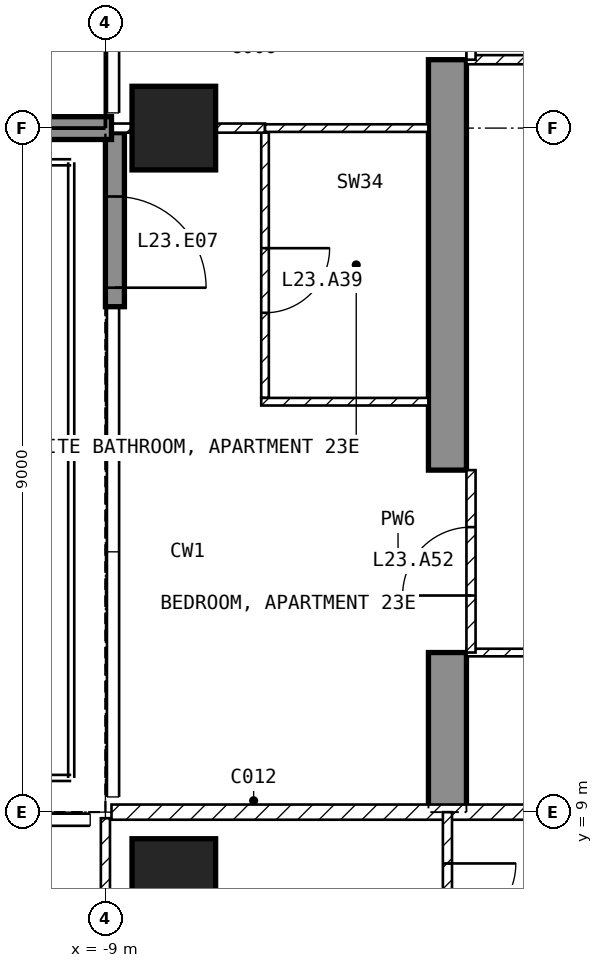
"""IFC4 building model, lengths in metres.
Left out: names, types, materials, properties, quantities, classifications, styles, units other than length and angle.
Written with IfcOpenShell. Run it as: python <this file> out.ifc"""

import sys

from ifc_helpers import new_model, si_unit, direction, frame, frame_2d, origin, origin_2d, place, context, subcontext, project, spatial, polyline, rectangle, outline, extrude, element, fill, save


model = new_model("IFC4")
c1 = context("Model", 3, precision=1e-05, world=origin(), true_north=direction((0.0, 1.0)))
c2 = subcontext(c1, "Body", "Model", "MODEL_VIEW")
j1 = project(units=[si_unit("LENGTHUNIT", "METRE"), si_unit("PLANEANGLEUNIT", "RADIAN")], contexts=[c1])
p1 = place(None, origin())
s1 = spatial("IfcSite", under=j1, at=p1, CompositionType="ELEMENT")
p2 = place(p1, origin())
s2 = spatial("IfcBuilding", under=s1, at=p2, CompositionType="ELEMENT")
p3 = place(p2, frame((0.0, 0.0, 102.4)))
s3 = spatial("IfcBuildingStorey", under=s2, at=p3, CompositionType="ELEMENT", Elevation=102.4)
for number, where, z_axis, x_axis in (
    (1, (-8.1, 8.1, -0.25), (0.0, 0.0, 1.0), (1.0, 0.0, 0.0)),
    (2, (-8.1, 18.0, -0.25), (0.0, 0.0, 1.0), (1.0, 0.0, 0.0)),
):
    element("IfcColumn", number, at=place(p3, frame(where, z_axis=z_axis, x_axis=x_axis)), inside=s3, PredefinedType="COLUMN", context=c2, shape_type="SweptSolid", body=[
        extrude(rectangle(XDim=1.1, YDim=1.1, at=origin_2d()), origin(), (0.0, 0.0, 1.0), 3.5),
    ])
p4 = place(p3, frame((-4.75, 9.0, -0.25), z_axis=(1.0, 0.0, 0.0), x_axis=(0.0, 1.0, 0.0)))
e3 = element("IfcWall", 3, at=p4, inside=s3, PredefinedType="SHEAR", context=c2, shape_type="SweptSolid", body=[
    extrude(outline(polyline([(0.0, 0.0), (2.1, 0.0), (2.1, 2.65), (4.5, 2.65), (4.5, 0.0), (9.9, 0.0), (9.9, 2.65), (12.3, 2.65), (12.3, 0.0), (16.55, 0.0), (16.55, 3.5), (0.0, 3.5), (0.0, 0.0)])), origin(), (0.0, 0.0, 1.0), 0.5),
])
p5 = place(p3, frame((-8.875, 17.94, 0.0), z_axis=(0.0, 0.0, 1.0), x_axis=(0.0, -1.0, 0.0)))
e4 = element("IfcWall", 4, at=p5, inside=s3, PredefinedType="SOLIDWALL", context=c2, shape_type="SweptSolid", body=[
    extrude(rectangle(XDim=2.29, YDim=0.25, at=frame_2d((1.145, 0.0))), origin(), (0.0, 0.0, 1.0), 3.25),
])
p6 = place(p5, frame((0.84, 0.0, 0.0)))
e5 = element("IfcOpeningElement", 5, at=p6, cuts=e4, PredefinedType="OPENING", context=c2, shape_type="SweptSolid", body=[
    extrude(rectangle(XDim=1.2, YDim=2.4, at=frame_2d((0.6, 1.2))), frame((0.0, 0.135, 0.0), z_axis=(0.0, -1.0, 0.0), x_axis=(1.0, 0.0, 0.0)), (0.0, 0.0, 1.0), 0.27),
])
p7 = place(p3, frame((-8.92, 18.0, 0.0), z_axis=(0.0, 0.0, 1.0), x_axis=(-1.0, 0.0, 0.0)))
e6 = element("IfcWall", 6, at=p7, inside=s3, PredefinedType="SOLIDWALL", context=c2, shape_type="SweptSolid", body=[
    extrude(rectangle(XDim=2.82, YDim=0.3, at=frame_2d((1.41, 0.0))), origin(), (0.0, 0.0, 1.0), 3.25),
])
p8 = place(p3, frame((-8.92, 9.0, 0.0), z_axis=(0.0, 0.0, 1.0), x_axis=(1.0, 0.0, 0.0)))
e7 = element("IfcWall", 7, at=p8, inside=s3, PredefinedType="PARTITIONING", context=c2, shape_type="SweptSolid", body=[
    extrude(rectangle(XDim=17.84, YDim=0.2, at=frame_2d((8.92, 0.0))), origin(), (0.0, 0.0, 1.0), 3.25),
])
p9 = place(p8, frame((8.42, 0.0, 0.0)))
e8 = element("IfcOpeningElement", 8, at=p9, cuts=e7, PredefinedType="OPENING", context=c2, shape_type="SweptSolid", body=[
    extrude(rectangle(XDim=1.0, YDim=2.1, at=frame_2d((0.5, 1.05))), frame((0.0, 0.11, 0.0), z_axis=(0.0, -1.0, 0.0), x_axis=(1.0, 0.0, 0.0)), (0.0, 0.0, 1.0), 0.22),
])
p10 = place(p3, frame((-9.0, 8.92, 0.0), z_axis=(0.0, 0.0, 1.0), x_axis=(0.0, -1.0, 0.0)))
e9 = element("IfcWall", 9, at=p10, inside=s3, PredefinedType="PARTITIONING", context=c2, shape_type="SweptSolid", body=[
    extrude(rectangle(XDim=7.62, YDim=0.12, at=frame_2d((3.81, 0.0))), origin(), (0.0, 0.0, 1.0), 3.25),
])
p11 = place(p10, frame((2.62, 0.0, 0.0)))
e10 = element("IfcOpeningElement", 10, at=p11, cuts=e9, PredefinedType="OPENING", context=c2, shape_type="SweptSolid", body=[
    extrude(rectangle(XDim=0.9, YDim=2.1, at=frame_2d((0.45, 1.05))), frame((0.0, 0.07, 0.0), z_axis=(0.0, -1.0, 0.0), x_axis=(1.0, 0.0, 0.0)), (0.0, 0.0, 1.0), 0.14),
])
p12 = place(p3, frame((-4.5, 9.0, 0.0), z_axis=(0.0, 0.0, 1.0), x_axis=(0.0, -1.0, 0.0)))
e11 = element("IfcWall", 11, at=p12, inside=s3, PredefinedType="PARTITIONING", context=c2, shape_type="SweptSolid", body=[
    extrude(rectangle(XDim=2.25, YDim=0.12, at=frame_2d((1.125, 0.0))), origin(), (0.0, 0.0, 1.0), 3.25),
])
p13 = place(p12, frame((0.675, 0.0, 0.0)))
e12 = element("IfcOpeningElement", 12, at=p13, cuts=e11, PredefinedType="OPENING", context=c2, shape_type="SweptSolid", body=[
    extrude(rectangle(XDim=0.9, YDim=2.1, at=frame_2d((0.45, 1.05))), frame((0.0, 0.07, 0.0), z_axis=(0.0, -1.0, 0.0), x_axis=(1.0, 0.0, 0.0)), (0.0, 0.0, 1.0), 0.14),
])
p14 = place(p3, frame((-4.25, 11.1, 0.0), z_axis=(0.0, 0.0, 1.0), x_axis=(1.0, 0.0, 0.0)))
e13 = element("IfcWall", 13, at=p14, inside=s3, PredefinedType="PARTITIONING", context=c2, shape_type="SweptSolid", body=[
    extrude(rectangle(XDim=2.15, YDim=0.1, at=frame_2d((1.075, 0.0))), origin(), (0.0, 0.0, 1.0), 3.25),
])
p15 = place(p3, frame((-4.25, 18.9, 0.0), z_axis=(0.0, 0.0, 1.0), x_axis=(1.0, 0.0, 0.0)))
e14 = element("IfcWall", 14, at=p15, inside=s3, PredefinedType="PARTITIONING", context=c2, shape_type="SweptSolid", body=[
    extrude(rectangle(XDim=8.5, YDim=0.12, at=frame_2d((4.25, 0.0))), origin(), (0.0, 0.0, 1.0), 3.25),
])
p16 = place(p15, frame((5.675, 0.0, 0.0)))
e15 = element("IfcOpeningElement", 15, at=p16, cuts=e14, PredefinedType="OPENING", context=c2, shape_type="SweptSolid", body=[
    extrude(rectangle(XDim=0.9, YDim=2.1, at=frame_2d((0.45, 1.05))), frame((0.0, 0.07, 0.0), z_axis=(0.0, -1.0, 0.0), x_axis=(1.0, 0.0, 0.0)), (0.0, 0.0, 1.0), 0.14),
])
p17 = place(p3, frame((-6.9, 17.94, 0.0), z_axis=(0.0, 0.0, 1.0), x_axis=(0.0, -1.0, 0.0)))
e16 = element("IfcWall", 16, at=p17, inside=s3, PredefinedType="PARTITIONING", context=c2, shape_type="SweptSolid", body=[
    extrude(rectangle(XDim=3.49, YDim=0.1, at=frame_2d((1.745, 0.0))), origin(), (0.0, 0.0, 1.0), 3.25),
])
p18 = place(p17, frame((1.52, 0.0, 0.0)))
e17 = element("IfcOpeningElement", 17, at=p18, cuts=e16, PredefinedType="OPENING", context=c2, shape_type="SweptSolid", body=[
    extrude(rectangle(XDim=0.85, YDim=2.1, at=frame_2d((0.425, 1.05))), frame((0.0, 0.06, 0.0), z_axis=(0.0, -1.0, 0.0), x_axis=(1.0, 0.0, 0.0)), (0.0, 0.0, 1.0), 0.12),
])
p19 = place(p3, frame((-6.95, 14.4, 0.0), z_axis=(0.0, 0.0, 1.0), x_axis=(1.0, 0.0, 0.0)))
e18 = element("IfcWall", 18, at=p19, inside=s3, PredefinedType="PARTITIONING", context=c2, shape_type="SweptSolid", body=[
    extrude(rectangle(XDim=2.2, YDim=0.1, at=frame_2d((1.1, 0.0))), origin(), (0.0, 0.0, 1.0), 3.25),
])
p20 = place(p3, frame((-8.92, 18.0, 0.0), z_axis=(0.0, 0.0, 1.0), x_axis=(1.0, 0.0, 0.0)))
e19 = element("IfcWall", 19, at=p20, inside=s3, PredefinedType="PARTITIONING", context=c2, shape_type="SweptSolid", body=[
    extrude(rectangle(XDim=2.02, YDim=0.12, at=frame_2d((1.01, 0.0))), origin(), (0.0, 0.0, 1.0), 2.414),
])
p21 = place(p3, frame((-6.9, 18.0, 0.0), z_axis=(0.0, 0.0, 1.0), x_axis=(1.0, 0.0, 0.0)))
e20 = element("IfcWall", 20, at=p21, inside=s3, PredefinedType="PARTITIONING", context=c2, shape_type="SweptSolid", body=[
    extrude(rectangle(XDim=2.15, YDim=0.1, at=frame_2d((1.075, 0.0))), origin(), (0.0, 0.0, 1.0), 2.414),
])
p22 = place(p3, frame((-4.19, 11.1, 0.0), z_axis=(0.0, 0.0, 1.0), x_axis=(0.0, 1.0, 0.0)))
e21 = element("IfcWall", 21, at=p22, inside=s3, PredefinedType="PARTITIONING", context=c2, shape_type="SweptSolid", body=[
    extrude(rectangle(XDim=2.4, YDim=0.12, at=frame_2d((1.2, 0.0))), origin(), (0.0, 0.0, 1.0), 2.4),
])
p23 = place(p22, frame((0.75, 0.0, 0.0)))
e22 = element("IfcOpeningElement", 22, at=p23, cuts=e21, PredefinedType="OPENING", context=c2, shape_type="SweptSolid", body=[
    extrude(rectangle(XDim=0.9, YDim=2.1, at=frame_2d((0.45, 1.05))), frame((0.0, 0.07, 0.0), z_axis=(0.0, -1.0, 0.0), x_axis=(1.0, 0.0, 0.0)), (0.0, 0.0, 1.0), 0.14),
])
p24 = place(p3, frame((-4.19, 18.9, 0.0), z_axis=(0.0, 0.0, 1.0), x_axis=(0.0, 1.0, 0.0)))
e23 = element("IfcWall", 23, at=p24, inside=s3, PredefinedType="PARTITIONING", context=c2, shape_type="SweptSolid", body=[
    extrude(rectangle(XDim=2.4, YDim=0.12, at=frame_2d((1.2, 0.0))), origin(), (0.0, 0.0, 1.0), 2.4),
])
p25 = place(p24, frame((0.75, 0.0, 0.0)))
e24 = element("IfcOpeningElement", 24, at=p25, cuts=e23, PredefinedType="OPENING", context=c2, shape_type="SweptSolid", body=[
    extrude(rectangle(XDim=0.9, YDim=2.1, at=frame_2d((0.45, 1.05))), frame((0.0, 0.07, 0.0), z_axis=(0.0, -1.0, 0.0), x_axis=(1.0, 0.0, 0.0)), (0.0, 0.0, 1.0), 0.14),
])
p26 = place(p6, origin())
e25 = element("IfcDoor", 25, at=p26, inside=s3, OperationType="SINGLE_SWING_RIGHT", PredefinedType="DOOR", context=c2, shape_type="SweptSolid", body=[
    extrude(rectangle(XDim=1.2, YDim=2.4, at=frame_2d((0.6, 1.2))), frame((0.0, 0.025, 0.0), z_axis=(0.0, -1.0, 0.0), x_axis=(1.0, 0.0, 0.0)), (0.0, 0.0, 1.0), 0.05),
])
fill(e5, e25)
p27 = place(p13, origin())
e26 = element("IfcDoor", 26, at=p27, inside=s3, OperationType="SINGLE_SWING_LEFT", PredefinedType="DOOR", context=c2, shape_type="SweptSolid", body=[
    extrude(rectangle(XDim=0.9, YDim=2.1, at=frame_2d((0.45, 1.05))), frame((0.0, 0.025, 0.0), z_axis=(0.0, -1.0, 0.0), x_axis=(1.0, 0.0, 0.0)), (0.0, 0.0, 1.0), 0.05),
])
fill(e12, e26)
p28 = place(p18, origin())
e27 = element("IfcDoor", 27, at=p28, inside=s3, OperationType="SINGLE_SWING_LEFT", PredefinedType="DOOR", context=c2, shape_type="SweptSolid", body=[
    extrude(rectangle(XDim=0.85, YDim=2.1, at=frame_2d((0.425, 1.05))), frame((0.0, 0.025, 0.0), z_axis=(0.0, -1.0, 0.0), x_axis=(1.0, 0.0, 0.0)), (0.0, 0.0, 1.0), 0.05),
])
fill(e17, e27)
p29 = place(p23, origin())
e28 = element("IfcDoor", 28, at=p29, inside=s3, OperationType="SINGLE_SWING_LEFT", PredefinedType="DOOR", context=c2, shape_type="SweptSolid", body=[
    extrude(rectangle(XDim=0.9, YDim=2.1, at=frame_2d((0.45, 1.05))), frame((0.0, 0.025, 0.0), z_axis=(0.0, -1.0, 0.0), x_axis=(1.0, 0.0, 0.0)), (0.0, 0.0, 1.0), 0.05),
])
fill(e22, e28)
save(model, sys.argv[1])
